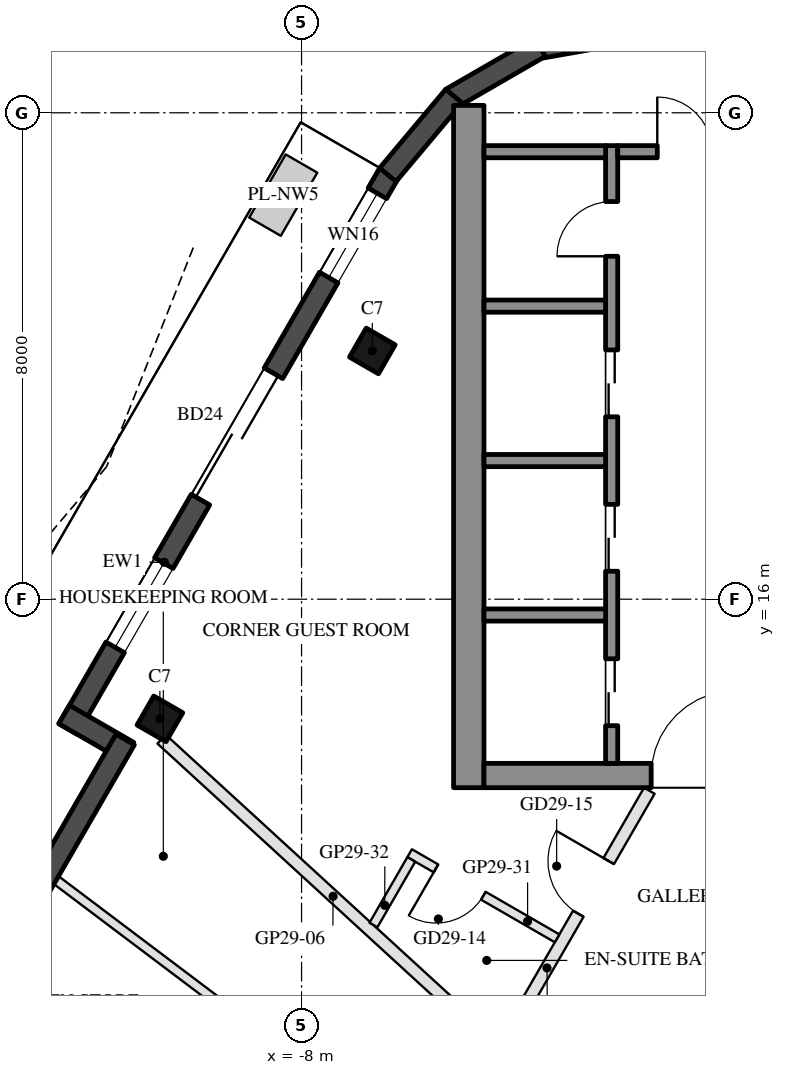
"""IFC4 building model, lengths in metres.
Left out: names, types, materials, properties, quantities, classifications, styles, units other than length and angle.
Written with IfcOpenShell. Run it as: python <this file> out.ifc"""

import sys

from ifc_helpers import new_model, si_unit, direction, frame, frame_2d, origin, origin_2d, place, context, subcontext, project, spatial, rectangle, hollow_rectangle, extrude, boolean, halfspace, element, fill, save


model = new_model("IFC4")
c1 = context("Model", 3, precision=1e-05, world=origin(), true_north=direction((0.0, 1.0)))
c2 = subcontext(c1, "Body", "Model", "MODEL_VIEW")
j1 = project(units=[si_unit("LENGTHUNIT", "METRE"), si_unit("PLANEANGLEUNIT", "RADIAN")], contexts=[c1])
p1 = place(None, origin())
s1 = spatial("IfcSite", under=j1, at=p1, CompositionType="ELEMENT")
p2 = place(p1, origin())
s2 = spatial("IfcBuilding", under=s1, at=p2, CompositionType="ELEMENT")
p3 = place(p2, frame((0.0, 0.0, 291.1)))
s3 = spatial("IfcBuildingStorey", under=s2, at=p3, CompositionType="ELEMENT", Elevation=291.1)
p4 = place(p3, frame((-6.836, 20.083, 0.0), z_axis=(0.0, 0.0, 1.0), x_axis=(0.5, 0.866025403784, 0.0)))
e1 = element("IfcColumn", 1, at=p4, inside=s3, PredefinedType="COLUMN", context=c2, shape_type="SweptSolid", body=[
    boolean("DIFFERENCE", extrude(hollow_rectangle(XDim=0.55, YDim=0.55, WallThickness=0.025, at=origin_2d()), origin(), (0.0, 0.0, 1.0), 3.7), halfspace(frame((0.0, 0.0, 0.04), z_axis=(0.0, 0.0, 1.0), x_axis=(1.0, 0.0, 0.0)), True)),
])
p5 = place(p3, frame((-10.33, 14.032, 0.0), z_axis=(0.0, 0.0, 1.0), x_axis=(0.5, 0.866025403784, 0.0)))
e2 = element("IfcColumn", 2, at=p5, inside=s3, PredefinedType="COLUMN", context=c2, shape_type="SweptSolid", body=[
    boolean("DIFFERENCE", extrude(hollow_rectangle(XDim=0.55, YDim=0.55, WallThickness=0.025, at=origin_2d()), origin(), (0.0, 0.0, 1.0), 3.7), halfspace(frame((0.0, 0.0, 0.034), z_axis=(0.0, 0.0, 1.0), x_axis=(1.0, 0.0, 0.0)), True)),
])
p6 = place(p3, frame((-6.563, 23.005, 0.0), z_axis=(0.0, 0.0, 1.0), x_axis=(-0.500010118922, -0.866019561543, 0.0)))
e3 = element("IfcWall", 3, at=p6, inside=s3, PredefinedType="SOLIDWALL", context=c2, shape_type="SweptSolid", body=[
    extrude(rectangle(XDim=10.554, YDim=0.35, at=frame_2d((5.277, 0.0))), origin(), (0.0, 0.0, 1.0), 3.55),
])
p7 = place(p6, frame((0.38, 0.0, 0.3)))
e4 = element("IfcOpeningElement", 4, at=p7, cuts=e3, PredefinedType="OPENING", context=c2, shape_type="SweptSolid", body=[
    extrude(rectangle(XDim=1.6, YDim=2.65, at=frame_2d((0.8, 1.325))), frame((0.0, 0.185, 0.0), z_axis=(0.0, -1.0, 0.0), x_axis=(1.0, 0.0, 0.0)), (0.0, 0.0, 1.0), 0.37),
])
p8 = place(p6, frame((3.798, 0.0, 0.0)))
e5 = element("IfcOpeningElement", 5, at=p8, cuts=e3, PredefinedType="OPENING", context=c2, shape_type="SweptSolid", body=[
    extrude(rectangle(XDim=2.4, YDim=2.4, at=frame_2d((1.2, 1.2))), frame((0.0, 0.185, 0.0), z_axis=(0.0, -1.0, 0.0), x_axis=(1.0, 0.0, 0.0)), (0.0, 0.0, 1.0), 0.37),
])
p9 = place(p6, frame((7.404, 0.0, 0.3)))
e6 = element("IfcOpeningElement", 6, at=p9, cuts=e3, PredefinedType="OPENING", context=c2, shape_type="SweptSolid", body=[
    extrude(rectangle(XDim=1.6, YDim=2.65, at=frame_2d((0.8, 1.325))), frame((0.0, 0.185, 0.0), z_axis=(0.0, -1.0, 0.0), x_axis=(1.0, 0.0, 0.0)), (0.0, 0.0, 1.0), 0.37),
])
p10 = place(p3, frame((-11.905, 14.104, 0.0), z_axis=(0.0, 0.0, 1.0), x_axis=(0.866005645448, -0.500034220881, 0.0)))
e7 = element("IfcWall", 7, at=p10, inside=s3, PredefinedType="SOLIDWALL", context=c2, shape_type="SweptSolid", body=[
    extrude(rectangle(XDim=1.22, YDim=0.35, at=frame_2d((0.61, 0.0))), origin(), (0.0, 0.0, 1.0), 3.55),
])
p11 = place(p3, frame((-10.901, 13.692, 0.0), z_axis=(0.0, 0.0, 1.0), x_axis=(-0.499987198161, -0.866032794804, 0.0)))
e8 = element("IfcWall", 8, at=p11, inside=s3, PredefinedType="SOLIDWALL", context=c2, shape_type="SweptSolid", body=[
    extrude(rectangle(XDim=5.827, YDim=0.35, at=frame_2d((2.914, 0.0))), origin(), (0.0, 0.0, 1.0), 3.55),
])
for number, where, z_axis, x_axis in (
    (9, (-2.472, 25.353, 0.0), (0.0, 0.0, 1.0), (-0.985, -0.174, 0.0)),
    (10, (-4.078, 25.08, 0.0), (0.0, 0.0, 1.0), (-0.866, -0.5, 0.0)),
    (11, (-5.495, 24.274, 0.0), (0.0, 0.0, 1.0), (-0.643, -0.766, 0.0)),
):
    element("IfcWall", number, at=place(p3, frame(where, z_axis=z_axis, x_axis=x_axis)), inside=s3, PredefinedType="SOLIDWALL", context=c2, shape_type="SweptSolid", body=[
        extrude(rectangle(XDim=1.689, YDim=0.35, at=frame_2d((0.845, 0.0))), origin(), (0.0, 0.0, 1.0), 3.55),
    ])
p12 = place(p3, frame((-5.25, 12.9, 0.0), z_axis=(0.0, 0.0, 1.0), x_axis=(0.0, 1.0, 0.0)))
e12 = element("IfcWall", 12, at=p12, inside=s3, PredefinedType="SHEAR", context=c2, shape_type="SweptSolid", body=[
    extrude(rectangle(XDim=11.222, YDim=0.5, at=frame_2d((5.611, 0.0))), origin(), (0.0, 0.0, 1.0), 3.5),
])
p13 = place(p3, frame((5.0, 13.1, 0.0), z_axis=(0.0, 0.0, 1.0), x_axis=(-1.0, 0.0, 0.0)))
e13 = element("IfcWall", 13, at=p13, inside=s3, PredefinedType="SHEAR", context=c2, shape_type="SweptSolid", body=[
    extrude(rectangle(XDim=10.0, YDim=0.4, at=frame_2d((5.0, 0.0))), origin(), (0.0, 0.0, 1.0), 3.5),
])
p14 = place(p13, frame((3.55, 0.0, 0.0)))
e14 = element("IfcOpeningElement", 14, at=p14, cuts=e13, PredefinedType="OPENING", context=c2, shape_type="SweptSolid", body=[
    extrude(rectangle(XDim=1.1, YDim=2.1, at=frame_2d((0.55, 1.05))), frame((0.0, 0.21, 0.0), z_axis=(0.0, -1.0, 0.0), x_axis=(1.0, 0.0, 0.0)), (0.0, 0.0, 1.0), 0.42),
])
p15 = place(p13, frame((5.85, 0.0, 0.0)))
e15 = element("IfcOpeningElement", 15, at=p15, cuts=e13, PredefinedType="OPENING", context=c2, shape_type="SweptSolid", body=[
    extrude(rectangle(XDim=1.4, YDim=2.1, at=frame_2d((0.7, 1.05))), frame((0.0, 0.21, 0.0), z_axis=(0.0, -1.0, 0.0), x_axis=(1.0, 0.0, 0.0)), (0.0, 0.0, 1.0), 0.42),
])
p16 = place(p3, frame((-2.9, 13.3, 0.0), z_axis=(0.0, 0.0, 1.0), x_axis=(0.0, 1.0, 0.0)))
e16 = element("IfcWall", 16, at=p16, inside=s3, PredefinedType="SHEAR", context=c2, shape_type="SweptSolid", body=[
    extrude(rectangle(XDim=10.16, YDim=0.2, at=frame_2d((5.08, 0.0))), origin(), (0.0, 0.0, 1.0), 3.5),
])
p17 = place(p16, frame((0.62, 0.0, 0.0)))
e17 = element("IfcOpeningElement", 17, at=p17, cuts=e16, PredefinedType="OPENING", context=c2, shape_type="SweptSolid", body=[
    extrude(rectangle(XDim=1.1, YDim=2.1, at=frame_2d((0.55, 1.05))), frame((0.0, 0.11, 0.0), z_axis=(0.0, -1.0, 0.0), x_axis=(1.0, 0.0, 0.0)), (0.0, 0.0, 1.0), 0.22),
])
p18 = place(p16, frame((3.16, 0.0, 0.0)))
e18 = element("IfcOpeningElement", 18, at=p18, cuts=e16, PredefinedType="OPENING", context=c2, shape_type="SweptSolid", body=[
    extrude(rectangle(XDim=1.1, YDim=2.1, at=frame_2d((0.55, 1.05))), frame((0.0, 0.11, 0.0), z_axis=(0.0, -1.0, 0.0), x_axis=(1.0, 0.0, 0.0)), (0.0, 0.0, 1.0), 0.22),
])
p19 = place(p16, frame((5.7, 0.0, 0.0)))
e19 = element("IfcOpeningElement", 19, at=p19, cuts=e16, PredefinedType="OPENING", context=c2, shape_type="SweptSolid", body=[
    extrude(rectangle(XDim=1.1, YDim=2.1, at=frame_2d((0.55, 1.05))), frame((0.0, 0.11, 0.0), z_axis=(0.0, -1.0, 0.0), x_axis=(1.0, 0.0, 0.0)), (0.0, 0.0, 1.0), 0.22),
])
p20 = place(p16, frame((8.34, 0.0, 0.0)))
e20 = element("IfcOpeningElement", 20, at=p20, cuts=e16, PredefinedType="OPENING", context=c2, shape_type="SweptSolid", body=[
    extrude(rectangle(XDim=0.9, YDim=2.1, at=frame_2d((0.45, 1.05))), frame((0.0, 0.11, 0.0), z_axis=(0.0, -1.0, 0.0), x_axis=(1.0, 0.0, 0.0)), (0.0, 0.0, 1.0), 0.22),
])
p21 = place(p3, frame((-1.0, 23.36, 0.0), z_axis=(0.0, 0.0, 1.0), x_axis=(-1.0, 0.0, 0.0)))
e21 = element("IfcWall", 21, at=p21, inside=s3, PredefinedType="SHEAR", context=c2, shape_type="SweptSolid", body=[
    extrude(rectangle(XDim=1.8, YDim=0.2, at=frame_2d((0.9, 0.0))), origin(), (0.0, 0.0, 1.0), 3.5),
])
p22 = place(p21, frame((0.25, 0.0, 0.0)))
e22 = element("IfcOpeningElement", 22, at=p22, cuts=e21, PredefinedType="OPENING", context=c2, shape_type="SweptSolid", body=[
    extrude(rectangle(XDim=0.9, YDim=2.1, at=frame_2d((0.45, 1.05))), frame((0.0, 0.11, 0.0), z_axis=(0.0, -1.0, 0.0), x_axis=(1.0, 0.0, 0.0)), (0.0, 0.0, 1.0), 0.22),
])
for number, where, z_axis, x_axis in (
    (23, (-3.0, 15.74, 0.0), (0.0, 0.0, 1.0), (-1.0, 0.0, 0.0)),
    (24, (-3.0, 18.28, 0.0), (0.0, 0.0, 1.0), (-1.0, 0.0, 0.0)),
    (25, (-3.0, 20.82, 0.0), (0.0, 0.0, 1.0), (-1.0, 0.0, 0.0)),
    (26, (-3.0, 23.36, 0.0), (0.0, 0.0, 1.0), (-1.0, 0.0, 0.0)),
):
    element("IfcWall", number, at=place(p3, frame(where, z_axis=z_axis, x_axis=x_axis)), inside=s3, PredefinedType="SHEAR", context=c2, shape_type="SweptSolid", body=[
        extrude(rectangle(XDim=2.0, YDim=0.2, at=frame_2d((1.0, 0.0))), origin(), (0.0, 0.0, 1.0), 3.5),
    ])
p23 = place(p3, frame((-10.302, 13.698, 0.0), z_axis=(0.0, 0.0, 1.0), x_axis=(0.737268015828, -0.675600379541, 0.0)))
e27 = element("IfcWall", 27, at=p23, inside=s3, PredefinedType="PARTITIONING", context=c2, shape_type="SweptSolid", body=[
    extrude(rectangle(XDim=7.653, YDim=0.2, at=frame_2d((3.826, 0.0))), origin(), (0.0, 0.0, 1.0), 3.55),
])
p24 = place(p3, frame((-4.685, 8.686, 0.0), z_axis=(0.0, 0.0, 1.0), x_axis=(0.500011088314, 0.866019001848, 0.0)))
e28 = element("IfcWall", 28, at=p24, inside=s3, PredefinedType="PARTITIONING", context=c2, shape_type="SweptSolid", body=[
    extrude(rectangle(XDim=4.808, YDim=0.2, at=frame_2d((2.404, 0.0))), origin(), (0.0, 0.0, 1.0), 3.05),
])
p25 = place(p24, frame((2.472, 0.0, 0.0)))
e29 = element("IfcOpeningElement", 29, at=p25, cuts=e28, PredefinedType="OPENING", context=c2, shape_type="SweptSolid", body=[
    extrude(rectangle(XDim=1.0, YDim=2.1, at=frame_2d((0.5, 1.05))), frame((0.0, 0.11, 0.0), z_axis=(0.0, -1.0, 0.0), x_axis=(1.0, 0.0, 0.0)), (0.0, 0.0, 1.0), 0.22),
])
p26 = place(p3, frame((-3.798, 10.423, 0.0), z_axis=(0.0, 0.0, 1.0), x_axis=(-0.866034573852, 0.49998411664, 0.0)))
e30 = element("IfcWall", 30, at=p26, inside=s3, PredefinedType="PARTITIONING", context=c2, shape_type="SweptSolid", body=[
    extrude(rectangle(XDim=2.8, YDim=0.15, at=frame_2d((1.4, 0.0))), origin(), (0.0, 0.0, 1.0), 3.05),
])
p27 = place(p26, frame((1.4, 0.0, 0.0)))
e31 = element("IfcOpeningElement", 31, at=p27, cuts=e30, PredefinedType="OPENING", context=c2, shape_type="SweptSolid", body=[
    extrude(rectangle(XDim=0.9, YDim=2.1, at=frame_2d((0.45, 1.05))), frame((0.0, 0.085, 0.0), z_axis=(0.0, -1.0, 0.0), x_axis=(1.0, 0.0, 0.0)), (0.0, 0.0, 1.0), 0.17),
])
p28 = place(p3, frame((-6.195, 11.72, 0.0), z_axis=(0.0, 0.0, 1.0), x_axis=(-0.500016430238, -0.866015917575, 0.0)))
e32 = element("IfcWall", 32, at=p28, inside=s3, PredefinedType="PARTITIONING", context=c2, shape_type="SweptSolid", body=[
    extrude(rectangle(XDim=1.246, YDim=0.15, at=frame_2d((0.623, 0.0))), origin(), (0.0, 0.0, 1.0), 3.05),
])
p29 = place(p3, frame((-12.034, 11.379, 0.0), z_axis=(0.0, 0.0, 1.0), x_axis=(0.798392848023, -0.602136911528, 0.0)))
e33 = element("IfcWall", 33, at=p29, inside=s3, PredefinedType="PARTITIONING", context=c2, shape_type="SweptSolid", body=[
    extrude(rectangle(XDim=7.871, YDim=0.15, at=frame_2d((3.936, 0.0))), origin(), (0.0, 0.0, 1.0), 3.05),
])
p30 = place(p7, origin())
e34 = element("IfcWindow", 34, at=p30, inside=s3, PartitioningType="SINGLE_PANEL", PredefinedType="WINDOW", context=c2, shape_type="SweptSolid", body=[
    extrude(rectangle(XDim=1.6, YDim=2.65, at=frame_2d((0.8, 1.325))), frame((0.0, 0.03, 0.0), z_axis=(0.0, -1.0, 0.0), x_axis=(1.0, 0.0, 0.0)), (0.0, 0.0, 1.0), 0.06),
])
fill(e4, e34)
p31 = place(p8, frame((2.4, 0.0, 0.0), z_axis=(0.0, 0.0, 1.0), x_axis=(-1.0, 0.0, 0.0)))
e35 = element("IfcDoor", 35, at=p31, inside=s3, OperationType="SLIDING_TO_LEFT", PredefinedType="DOOR", context=c2, shape_type="SweptSolid", body=[
    extrude(rectangle(XDim=2.4, YDim=2.4, at=frame_2d((1.2, 1.2))), frame((0.0, 0.025, 0.0), z_axis=(0.0, -1.0, 0.0), x_axis=(1.0, 0.0, 0.0)), (0.0, 0.0, 1.0), 0.05),
])
fill(e5, e35)
p32 = place(p9, origin())
e36 = element("IfcWindow", 36, at=p32, inside=s3, PartitioningType="SINGLE_PANEL", PredefinedType="WINDOW", context=c2, shape_type="SweptSolid", body=[
    extrude(rectangle(XDim=1.6, YDim=2.65, at=frame_2d((0.8, 1.325))), frame((0.0, 0.03, 0.0), z_axis=(0.0, -1.0, 0.0), x_axis=(1.0, 0.0, 0.0)), (0.0, 0.0, 1.0), 0.06),
])
fill(e6, e36)
p33 = place(p17, origin())
e37 = element("IfcDoor", 37, at=p33, inside=s3, OperationType="DOUBLE_DOOR_SLIDING", PredefinedType="DOOR", context=c2, shape_type="SweptSolid", body=[
    extrude(rectangle(XDim=1.1, YDim=2.1, at=frame_2d((0.55, 1.05))), frame((0.0, 0.025, 0.0), z_axis=(0.0, -1.0, 0.0), x_axis=(1.0, 0.0, 0.0)), (0.0, 0.0, 1.0), 0.05),
])
fill(e17, e37)
p34 = place(p18, origin())
e38 = element("IfcDoor", 38, at=p34, inside=s3, OperationType="DOUBLE_DOOR_SLIDING", PredefinedType="DOOR", context=c2, shape_type="SweptSolid", body=[
    extrude(rectangle(XDim=1.1, YDim=2.1, at=frame_2d((0.55, 1.05))), frame((0.0, 0.025, 0.0), z_axis=(0.0, -1.0, 0.0), x_axis=(1.0, 0.0, 0.0)), (0.0, 0.0, 1.0), 0.05),
])
fill(e18, e38)
p35 = place(p19, origin())
e39 = element("IfcDoor", 39, at=p35, inside=s3, OperationType="DOUBLE_DOOR_SLIDING", PredefinedType="DOOR", context=c2, shape_type="SweptSolid", body=[
    extrude(rectangle(XDim=1.1, YDim=2.1, at=frame_2d((0.55, 1.05))), frame((0.0, 0.025, 0.0), z_axis=(0.0, -1.0, 0.0), x_axis=(1.0, 0.0, 0.0)), (0.0, 0.0, 1.0), 0.05),
])
fill(e19, e39)
p36 = place(p20, origin())
e40 = element("IfcDoor", 40, at=p36, inside=s3, OperationType="SINGLE_SWING_LEFT", PredefinedType="DOOR", context=c2, shape_type="SweptSolid", body=[
    extrude(rectangle(XDim=0.9, YDim=2.1, at=frame_2d((0.45, 1.05))), frame((0.0, 0.025, 0.0), z_axis=(0.0, -1.0, 0.0), x_axis=(1.0, 0.0, 0.0)), (0.0, 0.0, 1.0), 0.05),
])
fill(e20, e40)
p37 = place(p22, frame((0.9, 0.0, 0.0), z_axis=(0.0, 0.0, 1.0), x_axis=(-1.0, 0.0, 0.0)))
e41 = element("IfcDoor", 41, at=p37, inside=s3, OperationType="SINGLE_SWING_LEFT", PredefinedType="DOOR", context=c2, shape_type="SweptSolid", body=[
    extrude(rectangle(XDim=0.9, YDim=2.1, at=frame_2d((0.45, 1.05))), frame((0.0, 0.025, 0.0), z_axis=(0.0, -1.0, 0.0), x_axis=(1.0, 0.0, 0.0)), (0.0, 0.0, 1.0), 0.05),
])
fill(e22, e41)
p38 = place(p15, frame((1.4, 0.0, 0.0), z_axis=(0.0, 0.0, 1.0), x_axis=(-1.0, 0.0, 0.0)))
e42 = element("IfcDoor", 42, at=p38, inside=s3, OperationType="DOUBLE_DOOR_SINGLE_SWING", PredefinedType="DOOR", context=c2, shape_type="SweptSolid", body=[
    extrude(rectangle(XDim=1.4, YDim=2.1, at=frame_2d((0.7, 1.05))), frame((0.0, 0.025, 0.0), z_axis=(0.0, -1.0, 0.0), x_axis=(1.0, 0.0, 0.0)), (0.0, 0.0, 1.0), 0.05),
])
fill(e15, e42)
p39 = place(p27, origin())
e43 = element("IfcDoor", 43, at=p39, inside=s3, OperationType="SINGLE_SWING_RIGHT", PredefinedType="DOOR", context=c2, shape_type="SweptSolid", body=[
    extrude(rectangle(XDim=0.9, YDim=2.1, at=frame_2d((0.45, 1.05))), frame((0.0, 0.025, 0.0), z_axis=(0.0, -1.0, 0.0), x_axis=(1.0, 0.0, 0.0)), (0.0, 0.0, 1.0), 0.05),
])
fill(e31, e43)
p40 = place(p25, origin())
e44 = element("IfcDoor", 44, at=p40, inside=s3, OperationType="SINGLE_SWING_RIGHT", PredefinedType="DOOR", context=c2, shape_type="SweptSolid", body=[
    extrude(rectangle(XDim=1.0, YDim=2.1, at=frame_2d((0.5, 1.05))), frame((0.0, 0.025, 0.0), z_axis=(0.0, -1.0, 0.0), x_axis=(1.0, 0.0, 0.0)), (0.0, 0.0, 1.0), 0.05),
])
fill(e29, e44)
save(model, sys.argv[1])
